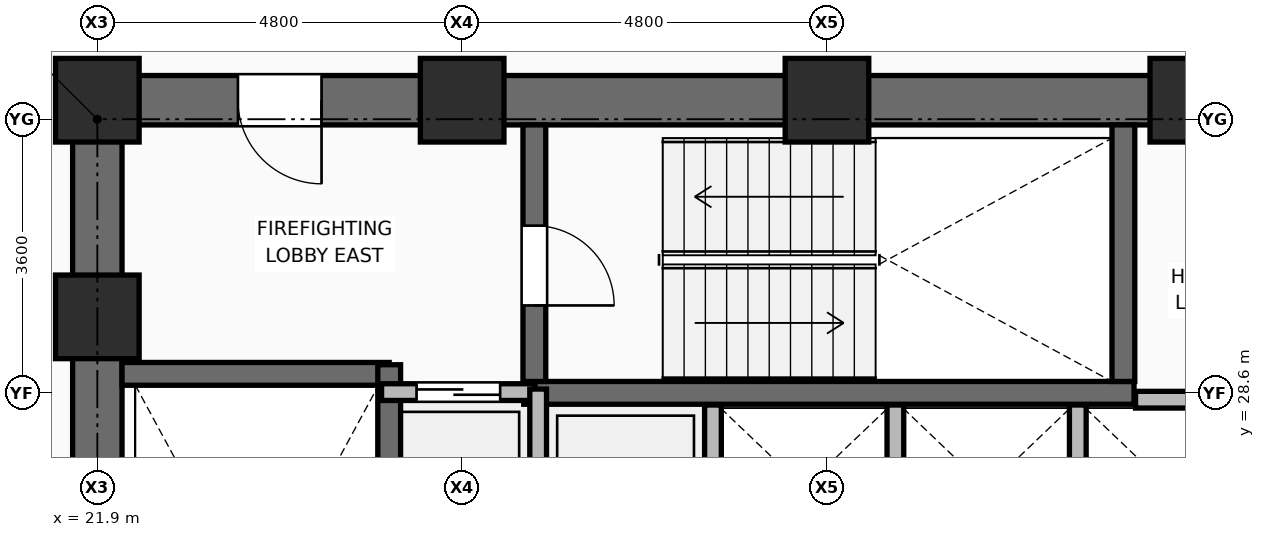
"""IFC4 building model, lengths in metres.
Left out: names, types, materials, properties, quantities, classifications, styles, units other than length and angle.
Written with IfcOpenShell. Run it as: python <this file> out.ifc"""

import sys

from ifc_helpers import new_model, si_unit, direction, frame, frame_2d, origin, origin_2d, place, context, subcontext, project, spatial, rectangle, extrude, element, fill, save


model = new_model("IFC4")
c1 = context("Model", 3, precision=1e-05, world=origin(), true_north=direction((0.0, 1.0)))
c2 = subcontext(c1, "Body", "Model", "MODEL_VIEW")
j1 = project(units=[si_unit("LENGTHUNIT", "METRE"), si_unit("PLANEANGLEUNIT", "RADIAN")], contexts=[c1])
p1 = place(None, origin())
s1 = spatial("IfcSite", under=j1, at=p1, CompositionType="ELEMENT")
p2 = place(p1, origin())
s2 = spatial("IfcBuilding", under=s1, at=p2, CompositionType="ELEMENT")
p3 = place(p2, frame((0.0, 0.0, 49.5)))
s3 = spatial("IfcBuildingStorey", under=s2, at=p3, CompositionType="ELEMENT", Elevation=49.5)
for number, where, z_axis, x_axis in (
    (1, (21.9, 29.6, 0.0), (0.0, 0.0, 1.0), (1.0, 0.0, 0.0)),
    (2, (21.9, 32.45, 0.0), (0.0, 0.0, 1.0), (1.0, 0.0, 0.0)),
    (3, (26.7, 32.45, 0.0), (0.0, 0.0, 1.0), (1.0, 0.0, 0.0)),
    (4, (31.5, 32.45, 0.0), (0.0, 0.0, 1.0), (1.0, 0.0, 0.0)),
    (5, (36.3, 32.45, 0.0), (0.0, 0.0, 1.0), (1.0, 0.0, 0.0)),
):
    element("IfcColumn", number, at=place(p3, frame(where, z_axis=z_axis, x_axis=x_axis)), inside=s3, PredefinedType="COLUMN", context=c2, shape_type="SweptSolid", body=[
        extrude(rectangle(XDim=1.1, YDim=1.1, at=origin_2d()), origin(), (0.0, 0.0, 1.0), 3.75),
    ])
p4 = place(p3, frame((30.0, 25.71, 0.0), z_axis=(0.0, 0.0, 1.0), x_axis=(0.0, 1.0, 0.0)))
e6 = element("IfcWall", 6, at=p4, inside=s3, PredefinedType="PARTITIONING", context=c2, shape_type="SweptSolid", body=[
    extrude(rectangle(XDim=2.73, YDim=0.22, at=frame_2d((1.365, 0.0))), origin(), (0.0, 0.0, 1.0), 3.545),
])
p5 = place(p3, frame((32.4, 26.2, 0.0), z_axis=(0.0, 0.0, 1.0), x_axis=(0.0, 1.0, 0.0)))
e7 = element("IfcWall", 7, at=p5, inside=s3, PredefinedType="PARTITIONING", context=c2, shape_type="SweptSolid", body=[
    extrude(rectangle(XDim=2.24, YDim=0.22, at=frame_2d((1.12, 0.0))), origin(), (0.0, 0.0, 1.0), 3.545),
])
p6 = place(p3, frame((34.8, 26.23, 0.0), z_axis=(0.0, 0.0, 1.0), x_axis=(0.0, 1.0, 0.0)))
e8 = element("IfcWall", 8, at=p6, inside=s3, PredefinedType="PARTITIONING", context=c2, shape_type="SweptSolid", body=[
    extrude(rectangle(XDim=2.21, YDim=0.22, at=frame_2d((1.105, 0.0))), origin(), (0.0, 0.0, 1.0), 3.545),
])
p7 = place(p3, frame((21.575, 32.45, 0.0), z_axis=(0.0, 0.0, 1.0), x_axis=(1.0, 0.0, 0.0)))
e9 = element("IfcWall", 9, at=p7, inside=s3, PredefinedType="SHEAR", context=c2, shape_type="SweptSolid", body=[
    extrude(rectangle(XDim=19.85, YDim=0.65, at=frame_2d((9.925, 0.0))), origin(), (0.0, 0.0, 1.0), 3.57),
])
p8 = place(p7, frame((2.175, 0.0, 0.0)))
e10 = element("IfcOpeningElement", 10, at=p8, cuts=e9, PredefinedType="OPENING", context=c2, shape_type="SweptSolid", body=[
    extrude(rectangle(XDim=1.1, YDim=2.1, at=frame_2d((0.55, 1.05))), frame((0.0, 0.335, 0.0), z_axis=(0.0, -1.0, 0.0), x_axis=(1.0, 0.0, 0.0)), (0.0, 0.0, 1.0), 0.67),
])
p9 = place(p7, frame((15.565, 0.0, 0.0)))
e11 = element("IfcOpeningElement", 11, at=p9, cuts=e9, PredefinedType="OPENING", context=c2, shape_type="SweptSolid", body=[
    extrude(rectangle(XDim=1.0, YDim=2.1, at=frame_2d((0.5, 1.05))), frame((0.0, 0.335, 0.0), z_axis=(0.0, -1.0, 0.0), x_axis=(1.0, 0.0, 0.0)), (0.0, 0.0, 1.0), 0.67),
])
p10 = place(p7, frame((17.575, 0.0, 0.0)))
e12 = element("IfcOpeningElement", 12, at=p10, cuts=e9, PredefinedType="OPENING", context=c2, shape_type="SweptSolid", body=[
    extrude(rectangle(XDim=0.9, YDim=2.1, at=frame_2d((0.45, 1.05))), frame((0.0, 0.335, 0.0), z_axis=(0.0, -1.0, 0.0), x_axis=(1.0, 0.0, 0.0)), (0.0, 0.0, 1.0), 0.67),
])
p11 = place(p3, frame((21.9, 18.125, 0.0), z_axis=(0.0, 0.0, 1.0), x_axis=(0.0, 1.0, 0.0)))
e13 = element("IfcWall", 13, at=p11, inside=s3, PredefinedType="SHEAR", context=c2, shape_type="SweptSolid", body=[
    extrude(rectangle(XDim=14.0, YDim=0.65, at=frame_2d((7.0, 0.0))), origin(), (0.0, 0.0, 1.0), 3.57),
])
p12 = place(p3, frame((22.225, 28.85, 0.0), z_axis=(0.0, 0.0, 1.0), x_axis=(1.0, 0.0, 0.0)))
e14 = element("IfcWall", 14, at=p12, inside=s3, PredefinedType="SHEAR", context=c2, shape_type="SweptSolid", body=[
    extrude(rectangle(XDim=3.515, YDim=0.3, at=frame_2d((1.757, 0.0))), origin(), (0.0, 0.0, 1.0), 3.57),
])
p13 = place(p3, frame((25.74, 20.98, 0.0), z_axis=(0.0, 0.0, 1.0), x_axis=(0.0, 1.0, 0.0)))
e15 = element("IfcWall", 15, at=p13, inside=s3, PredefinedType="SHEAR", context=c2, shape_type="SweptSolid", body=[
    extrude(rectangle(XDim=7.99, YDim=0.3, at=frame_2d((3.995, 0.0))), origin(), (0.0, 0.0, 1.0), 3.57),
])
p14 = place(p3, frame((27.51, 28.6, 0.0), z_axis=(0.0, 0.0, 1.0), x_axis=(1.0, 0.0, 0.0)))
e16 = element("IfcWall", 16, at=p14, inside=s3, PredefinedType="SHEAR", context=c2, shape_type="SweptSolid", body=[
    extrude(rectangle(XDim=8.03, YDim=0.3, at=frame_2d((4.015, 0.0))), origin(), (0.0, 0.0, 1.0), 3.57),
])
p15 = place(p3, frame((27.65, 28.75, 0.0), z_axis=(0.0, 0.0, 1.0), x_axis=(0.0, 1.0, 0.0)))
e17 = element("IfcWall", 17, at=p15, inside=s3, PredefinedType="SHEAR", context=c2, shape_type="SweptSolid", body=[
    extrude(rectangle(XDim=3.375, YDim=0.3, at=frame_2d((1.688, 0.0))), origin(), (0.0, 0.0, 1.0), 3.57),
])
p16 = place(p15, frame((1.0, 0.0, 0.0)))
e18 = element("IfcOpeningElement", 18, at=p16, cuts=e17, PredefinedType="OPENING", context=c2, shape_type="SweptSolid", body=[
    extrude(rectangle(XDim=1.05, YDim=2.1, at=frame_2d((0.525, 1.05))), frame((0.0, 0.16, 0.0), z_axis=(0.0, -1.0, 0.0), x_axis=(1.0, 0.0, 0.0)), (0.0, 0.0, 1.0), 0.32),
])
p17 = place(p3, frame((35.4, 28.75, 0.0), z_axis=(0.0, 0.0, 1.0), x_axis=(0.0, 1.0, 0.0)))
e19 = element("IfcWall", 19, at=p17, inside=s3, PredefinedType="SHEAR", context=c2, shape_type="SweptSolid", body=[
    extrude(rectangle(XDim=3.375, YDim=0.3, at=frame_2d((1.688, 0.0))), origin(), (0.0, 0.0, 1.0), 3.57),
])
p18 = place(p3, frame((25.64, 28.61, 0.0), z_axis=(0.0, 0.0, 1.0), x_axis=(1.0, 0.0, 0.0)))
e20 = element("IfcWall", 20, at=p18, inside=s3, PredefinedType="PARTITIONING", context=c2, shape_type="SweptSolid", body=[
    extrude(rectangle(XDim=2.02, YDim=0.22, at=frame_2d((1.01, 0.0))), origin(), (0.0, 0.0, 1.0), 3.55),
])
p19 = place(p18, frame((0.46, 0.0, 0.0)))
e21 = element("IfcOpeningElement", 21, at=p19, cuts=e20, PredefinedType="OPENING", context=c2, shape_type="SweptSolid", body=[
    extrude(rectangle(XDim=1.1, YDim=2.2, at=frame_2d((0.55, 1.1))), frame((0.0, 0.12, 0.0), z_axis=(0.0, -1.0, 0.0), x_axis=(1.0, 0.0, 0.0)), (0.0, 0.0, 1.0), 0.24),
])
p20 = place(p3, frame((35.56, 28.51, 0.0), z_axis=(0.0, 0.0, 1.0), x_axis=(1.0, 0.0, 0.0)))
e22 = element("IfcWall", 22, at=p20, inside=s3, PredefinedType="PARTITIONING", context=c2, shape_type="SweptSolid", body=[
    extrude(rectangle(XDim=1.6, YDim=0.22, at=frame_2d((0.8, 0.0))), origin(), (0.0, 0.0, 1.0), 3.55),
])
p21 = place(p3, frame((27.7, 25.65, 0.0), z_axis=(0.0, 0.0, 1.0), x_axis=(0.0, 1.0, 0.0)))
e23 = element("IfcWall", 23, at=p21, inside=s3, PredefinedType="PARTITIONING", context=c2, shape_type="SweptSolid", body=[
    extrude(rectangle(XDim=3.0, YDim=0.22, at=frame_2d((1.5, 0.0))), origin(), (0.0, 0.0, 1.0), 3.55),
])
p22 = place(p16, frame((1.05, 0.0, 0.0), z_axis=(0.0, 0.0, 1.0), x_axis=(-1.0, 0.0, 0.0)))
e24 = element("IfcDoor", 24, at=p22, inside=s3, OperationType="SINGLE_SWING_RIGHT", PredefinedType="DOOR", context=c2, shape_type="SweptSolid", body=[
    extrude(rectangle(XDim=1.05, YDim=2.1, at=frame_2d((0.525, 1.05))), frame((0.0, 0.025, 0.0), z_axis=(0.0, -1.0, 0.0), x_axis=(1.0, 0.0, 0.0)), (0.0, 0.0, 1.0), 0.05),
])
fill(e18, e24)
p23 = place(p19, origin())
e25 = element("IfcDoor", 25, at=p23, inside=s3, OperationType="DOUBLE_DOOR_SLIDING", PredefinedType="DOOR", context=c2, shape_type="SweptSolid", body=[
    extrude(rectangle(XDim=1.1, YDim=2.2, at=frame_2d((0.55, 1.1))), frame((0.0, 0.025, 0.0), z_axis=(0.0, -1.0, 0.0), x_axis=(1.0, 0.0, 0.0)), (0.0, 0.0, 1.0), 0.05),
])
fill(e21, e25)
p24 = place(p8, frame((1.1, 0.0, 0.0), z_axis=(0.0, 0.0, 1.0), x_axis=(-1.0, 0.0, 0.0)))
e26 = element("IfcDoor", 26, at=p24, inside=s3, OperationType="SINGLE_SWING_LEFT", PredefinedType="DOOR", context=c2, shape_type="SweptSolid", body=[
    extrude(rectangle(XDim=1.1, YDim=2.1, at=frame_2d((0.55, 1.05))), frame((0.0, 0.025, 0.0), z_axis=(0.0, -1.0, 0.0), x_axis=(1.0, 0.0, 0.0)), (0.0, 0.0, 1.0), 0.05),
])
fill(e10, e26)
save(model, sys.argv[1])
